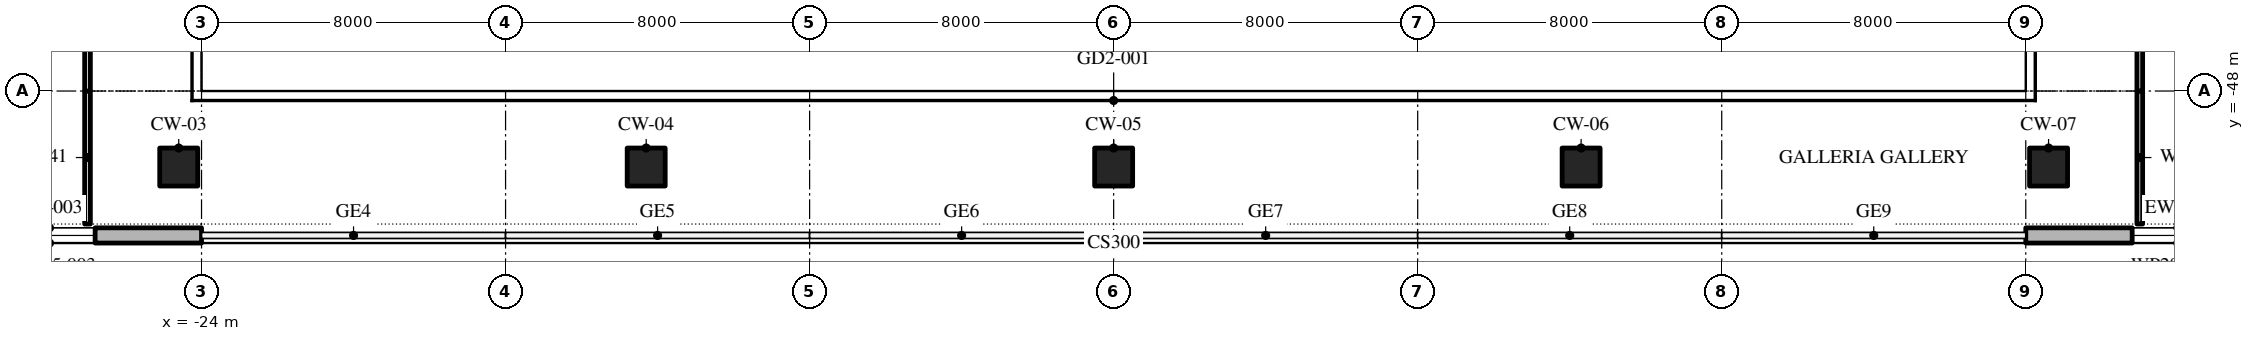
"""IFC4 building model, lengths in metres.
Left out: names, types, materials, properties, quantities, classifications, styles, units other than length and angle.
Written with IfcOpenShell. Run it as: python <this file> out.ifc"""

import sys

from ifc_helpers import new_model, si_unit, direction, frame, frame_2d, origin, origin_2d, place, context, subcontext, project, spatial, polyline, rectangle, outline, extrude, element, fill, save


model = new_model("IFC4")
c1 = context("Model", 3, precision=1e-05, world=origin(), true_north=direction((0.0, 1.0)))
c2 = subcontext(c1, "Body", "Model", "MODEL_VIEW")
j1 = project(units=[si_unit("LENGTHUNIT", "METRE"), si_unit("PLANEANGLEUNIT", "RADIAN")], contexts=[c1])
p1 = place(None, origin())
s1 = spatial("IfcSite", under=j1, at=p1, CompositionType="ELEMENT")
p2 = place(p1, origin())
s2 = spatial("IfcBuilding", under=s1, at=p2, CompositionType="ELEMENT")
p3 = place(p2, frame((0.0, 0.0, 28.8)))
s3 = spatial("IfcBuildingStorey", under=s2, at=p3, CompositionType="ELEMENT", Elevation=28.8)
for number, where, z_axis, x_axis in (
    (1, (-24.6, -50.0, 0.0), (0.0, 0.0, 1.0), (1.0, 0.0, 0.0)),
    (2, (-12.3, -50.0, 0.0), (0.0, 0.0, 1.0), (1.0, 0.0, 0.0)),
    (3, (0.0, -50.0, 0.0), (0.0, 0.0, 1.0), (1.0, 0.0, 0.0)),
    (4, (12.3, -50.0, 0.0), (0.0, 0.0, 1.0), (1.0, 0.0, 0.0)),
    (5, (24.6, -50.0, 0.0), (0.0, 0.0, 1.0), (1.0, 0.0, 0.0)),
):
    element("IfcColumn", number, at=place(p3, frame(where, z_axis=z_axis, x_axis=x_axis)), inside=s3, PredefinedType="COLUMN", context=c2, shape_type="SweptSolid", body=[
        extrude(rectangle(XDim=1.0, YDim=1.0, at=origin_2d()), origin(), (0.0, 0.0, 1.0), 4.35),
    ])
p4 = place(p3, frame((-32.0, -51.8, 0.0), z_axis=(0.0, 0.0, 1.0), x_axis=(1.0, 0.0, 0.0)))
e6 = element("IfcWall", 6, at=p4, inside=s3, PredefinedType="STANDARD", context=c2, shape_type="SweptSolid", body=[
    extrude(rectangle(XDim=8.0, YDim=0.4, at=frame_2d((4.0, 0.0))), origin(), (0.0, 0.0, 1.0), 4.35),
])
p5 = place(p4, frame((2.8, 0.0, 0.9)))
e7 = element("IfcOpeningElement", 7, at=p5, cuts=e6, PredefinedType="OPENING", context=c2, shape_type="SweptSolid", body=[
    extrude(outline(polyline([(0.0, 0.0), (2.4, 0.0), (2.4, 1.425), (2.378, 1.677), (2.312, 1.921), (2.205, 2.15), (2.06, 2.356), (1.881, 2.535), (1.674, 2.679), (1.444, 2.785), (1.2, 2.85), (0.956, 2.785), (0.726, 2.679), (0.519, 2.535), (0.34, 2.356), (0.195, 2.15), (0.088, 1.921), (0.022, 1.677), (0.0, 1.425), (0.0, 0.0)])), frame((0.0, 0.21, 0.0), z_axis=(0.0, -1.0, 0.0), x_axis=(1.0, 0.0, 0.0)), (0.0, 0.0, 1.0), 0.42),
])
p6 = place(p3, frame((24.0, -51.8, 0.0), z_axis=(0.0, 0.0, 1.0), x_axis=(1.0, 0.0, 0.0)))
e8 = element("IfcWall", 8, at=p6, inside=s3, PredefinedType="STANDARD", context=c2, shape_type="SweptSolid", body=[
    extrude(rectangle(XDim=8.0, YDim=0.4, at=frame_2d((4.0, 0.0))), origin(), (0.0, 0.0, 1.0), 4.35),
])
p7 = place(p6, frame((2.8, 0.0, 0.9)))
e9 = element("IfcOpeningElement", 9, at=p7, cuts=e8, PredefinedType="OPENING", context=c2, shape_type="SweptSolid", body=[
    extrude(outline(polyline([(0.0, 0.0), (2.4, 0.0), (2.4, 1.425), (2.378, 1.677), (2.312, 1.921), (2.205, 2.15), (2.06, 2.356), (1.881, 2.535), (1.674, 2.679), (1.444, 2.785), (1.2, 2.85), (0.956, 2.785), (0.726, 2.679), (0.519, 2.535), (0.34, 2.356), (0.195, 2.15), (0.088, 1.921), (0.022, 1.677), (0.0, 1.425), (0.0, 0.0)])), frame((0.0, 0.21, 0.0), z_axis=(0.0, -1.0, 0.0), x_axis=(1.0, 0.0, 0.0)), (0.0, 0.0, 1.0), 0.42),
])
p8 = place(p3, frame((-27.0, -51.5, 0.0), z_axis=(0.0, 0.0, 1.0), x_axis=(0.0, 1.0, 0.0)))
e10 = element("IfcWall", 10, at=p8, inside=s3, PredefinedType="PARTITIONING", context=c2, shape_type="SweptSolid", body=[
    extrude(rectangle(XDim=3.5, YDim=0.15, at=frame_2d((1.75, 0.0))), origin(), (0.0, 0.0, 1.0), 4.35),
])
p9 = place(p3, frame((-27.0, -48.0, 0.0), z_axis=(0.0, 0.0, 1.0), x_axis=(0.0, 1.0, 0.0)))
e11 = element("IfcWall", 11, at=p9, inside=s3, PredefinedType="PARTITIONING", context=c2, shape_type="SweptSolid", body=[
    extrude(rectangle(XDim=6.0, YDim=0.15, at=frame_2d((3.0, 0.0))), origin(), (0.0, 0.0, 1.0), 4.35),
])
p10 = place(p9, frame((2.5, 0.0, 0.0)))
e12 = element("IfcOpeningElement", 12, at=p10, cuts=e11, PredefinedType="OPENING", context=c2, shape_type="SweptSolid", body=[
    extrude(rectangle(XDim=1.0, YDim=2.1, at=frame_2d((0.5, 1.05))), frame((0.0, 0.085, 0.0), z_axis=(0.0, -1.0, 0.0), x_axis=(1.0, 0.0, 0.0)), (0.0, 0.0, 1.0), 0.17),
])
p11 = place(p3, frame((27.0, -51.5, 0.0), z_axis=(0.0, 0.0, 1.0), x_axis=(0.0, 1.0, 0.0)))
e13 = element("IfcWall", 13, at=p11, inside=s3, PredefinedType="PARTITIONING", context=c2, shape_type="SweptSolid", body=[
    extrude(rectangle(XDim=3.5, YDim=0.15, at=frame_2d((1.75, 0.0))), origin(), (0.0, 0.0, 1.0), 4.35),
])
p12 = place(p3, frame((27.0, -48.0, 0.0), z_axis=(0.0, 0.0, 1.0), x_axis=(0.0, 1.0, 0.0)))
e14 = element("IfcWall", 14, at=p12, inside=s3, PredefinedType="PARTITIONING", context=c2, shape_type="SweptSolid", body=[
    extrude(rectangle(XDim=6.0, YDim=0.15, at=frame_2d((3.0, 0.0))), origin(), (0.0, 0.0, 1.0), 4.35),
])
p13 = place(p12, frame((2.5, 0.0, 0.0)))
e15 = element("IfcOpeningElement", 15, at=p13, cuts=e14, PredefinedType="OPENING", context=c2, shape_type="SweptSolid", body=[
    extrude(rectangle(XDim=1.0, YDim=2.1, at=frame_2d((0.5, 1.05))), frame((0.0, 0.085, 0.0), z_axis=(0.0, -1.0, 0.0), x_axis=(1.0, 0.0, 0.0)), (0.0, 0.0, 1.0), 0.17),
])
p14 = place(p5, origin())
e16 = element("IfcWindow", 16, at=p14, inside=s3, PartitioningType="DOUBLE_PANEL_VERTICAL", PredefinedType="WINDOW", context=c2, shape_type="SweptSolid", body=[
    extrude(outline(polyline([(0.0, 0.0), (2.4, 0.0), (2.4, 1.425), (2.378, 1.677), (2.312, 1.921), (2.205, 2.15), (2.06, 2.356), (1.881, 2.535), (1.674, 2.679), (1.444, 2.785), (1.2, 2.85), (0.956, 2.785), (0.726, 2.679), (0.519, 2.535), (0.34, 2.356), (0.195, 2.15), (0.088, 1.921), (0.022, 1.677), (0.0, 1.425), (0.0, 0.0)])), frame((0.0, 0.03, 0.0), z_axis=(0.0, -1.0, 0.0), x_axis=(1.0, 0.0, 0.0)), (0.0, 0.0, 1.0), 0.06),
])
fill(e7, e16)
p15 = place(p7, origin())
e17 = element("IfcWindow", 17, at=p15, inside=s3, PartitioningType="DOUBLE_PANEL_VERTICAL", PredefinedType="WINDOW", context=c2, shape_type="SweptSolid", body=[
    extrude(outline(polyline([(0.0, 0.0), (2.4, 0.0), (2.4, 1.425), (2.378, 1.677), (2.312, 1.921), (2.205, 2.15), (2.06, 2.356), (1.881, 2.535), (1.674, 2.679), (1.444, 2.785), (1.2, 2.85), (0.956, 2.785), (0.726, 2.679), (0.519, 2.535), (0.34, 2.356), (0.195, 2.15), (0.088, 1.921), (0.022, 1.677), (0.0, 1.425), (0.0, 0.0)])), frame((0.0, 0.03, 0.0), z_axis=(0.0, -1.0, 0.0), x_axis=(1.0, 0.0, 0.0)), (0.0, 0.0, 1.0), 0.06),
])
fill(e9, e17)
p16 = place(p3, frame((0.0, 0.0, 4.4)))
p17 = place(p16, frame((-22.5, -40.0, 0.0)))
p18 = place(p17, frame((0.0, 0.0, 0.35)))
e18 = element("IfcWindow", 18, at=p18, inside=s3, PartitioningType="SINGLE_PANEL", PredefinedType="SKYLIGHT", context=c2, shape_type="SweptSolid", body=[
    extrude(rectangle(XDim=2.4, YDim=14.8, at=origin_2d()), origin(), (0.0, 0.0, 1.0), 0.05),
])
p19 = place(p16, frame((-17.375, -40.0, 0.0)))
p20 = place(p19, frame((0.0, 0.0, 0.35)))
e19 = element("IfcWindow", 19, at=p20, inside=s3, PartitioningType="SINGLE_PANEL", PredefinedType="SKYLIGHT", context=c2, shape_type="SweptSolid", body=[
    extrude(rectangle(XDim=6.05, YDim=14.8, at=origin_2d()), origin(), (0.0, 0.0, 1.0), 0.05),
])
p21 = place(p16, frame((-10.425, -40.0, 0.0)))
p22 = place(p21, frame((0.0, 0.0, 0.35)))
e20 = element("IfcWindow", 20, at=p22, inside=s3, PartitioningType="SINGLE_PANEL", PredefinedType="SKYLIGHT", context=c2, shape_type="SweptSolid", body=[
    extrude(rectangle(XDim=6.05, YDim=14.8, at=origin_2d()), origin(), (0.0, 0.0, 1.0), 0.05),
])
p23 = place(p16, frame((-3.475, -40.0, 0.0)))
p24 = place(p23, frame((0.0, 0.0, 0.35)))
e21 = element("IfcWindow", 21, at=p24, inside=s3, PartitioningType="SINGLE_PANEL", PredefinedType="SKYLIGHT", context=c2, shape_type="SweptSolid", body=[
    extrude(rectangle(XDim=6.05, YDim=14.8, at=origin_2d()), origin(), (0.0, 0.0, 1.0), 0.05),
])
p25 = place(p16, frame((3.475, -40.0, 0.0)))
p26 = place(p25, frame((0.0, 0.0, 0.35)))
e22 = element("IfcWindow", 22, at=p26, inside=s3, PartitioningType="SINGLE_PANEL", PredefinedType="SKYLIGHT", context=c2, shape_type="SweptSolid", body=[
    extrude(rectangle(XDim=6.05, YDim=14.8, at=origin_2d()), origin(), (0.0, 0.0, 1.0), 0.05),
])
p27 = place(p16, frame((10.425, -40.0, 0.0)))
p28 = place(p27, frame((0.0, 0.0, 0.35)))
e23 = element("IfcWindow", 23, at=p28, inside=s3, PartitioningType="SINGLE_PANEL", PredefinedType="SKYLIGHT", context=c2, shape_type="SweptSolid", body=[
    extrude(rectangle(XDim=6.05, YDim=14.8, at=origin_2d()), origin(), (0.0, 0.0, 1.0), 0.05),
])
p29 = place(p16, frame((17.375, -40.0, 0.0)))
p30 = place(p29, frame((0.0, 0.0, 0.35)))
e24 = element("IfcWindow", 24, at=p30, inside=s3, PartitioningType="SINGLE_PANEL", PredefinedType="SKYLIGHT", context=c2, shape_type="SweptSolid", body=[
    extrude(rectangle(XDim=6.05, YDim=14.8, at=origin_2d()), origin(), (0.0, 0.0, 1.0), 0.05),
])
p31 = place(p16, frame((22.5, -40.0, 0.0)))
p32 = place(p31, frame((0.0, 0.0, 0.35)))
e25 = element("IfcWindow", 25, at=p32, inside=s3, PartitioningType="SINGLE_PANEL", PredefinedType="SKYLIGHT", context=c2, shape_type="SweptSolid", body=[
    extrude(rectangle(XDim=2.4, YDim=14.8, at=origin_2d()), origin(), (0.0, 0.0, 1.0), 0.05),
])
save(model, sys.argv[1])
